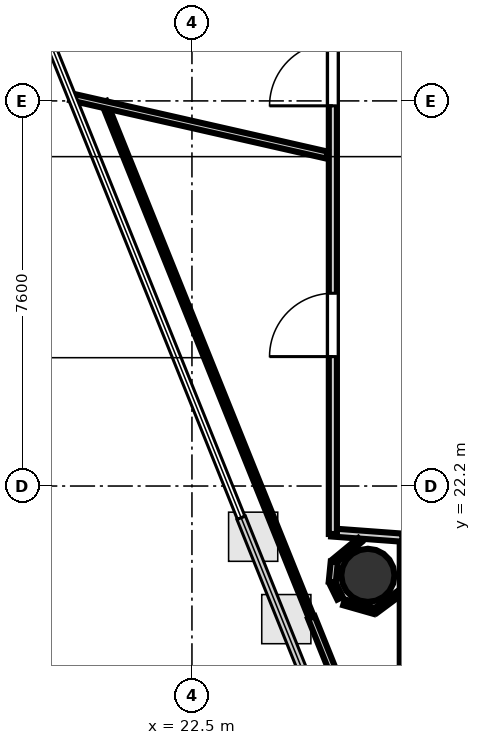
"""IFC4 building model, lengths in metres.
Left out: names, types, materials, properties, quantities, classifications, styles, units other than length and angle.
Written with IfcOpenShell. Run it as: python <this file> out.ifc"""

import sys

from ifc_helpers import new_model, si_unit, direction, frame, frame_2d, origin, origin_2d, place, context, subcontext, project, spatial, rectangle, hollow_circle, extrude, element, fill, save


model = new_model("IFC4")
c1 = context("Model", 3, precision=1e-05, world=origin(), true_north=direction((0.0, 1.0)))
c2 = subcontext(c1, "Body", "Model", "MODEL_VIEW")
j1 = project(units=[si_unit("LENGTHUNIT", "METRE"), si_unit("PLANEANGLEUNIT", "RADIAN")], contexts=[c1])
p1 = place(None, origin())
s1 = spatial("IfcSite", under=j1, at=p1, CompositionType="ELEMENT")
p2 = place(p1, origin())
s2 = spatial("IfcBuilding", under=s1, at=p2, CompositionType="ELEMENT")
p3 = place(p2, frame((0.0, 0.0, 242.7)))
s3 = spatial("IfcBuildingStorey", under=s2, at=p3, CompositionType="ELEMENT", Elevation=242.7)
p4 = place(p3, frame((25.972, 20.437, 0.0), z_axis=(0.0, 0.0, 1.0), x_axis=(1.0, 0.0, 0.0)))
e1 = element("IfcColumn", 1, at=p4, inside=s3, PredefinedType="COLUMN", context=c2, shape_type="SweptSolid", body=[
    extrude(hollow_circle(Radius=0.525, WallThickness=0.028, at=origin_2d()), origin(), (0.0, 0.0, 1.0), 3.7),
])
p5 = place(p3, frame((26.681, 17.95, 0.0), z_axis=(0.0, 0.0, 1.0), x_axis=(0.0, 1.0, 0.0)))
e2 = element("IfcWall", 2, at=p5, inside=s3, PredefinedType="PARTITIONING", context=c2, shape_type="SweptSolid", body=[
    extrude(rectangle(XDim=3.2, YDim=0.16, at=frame_2d((1.6, 0.0))), origin(), (0.0, 0.0, 1.0), 2.84),
])
p6 = place(p3, frame((26.652, 21.181, 0.0), z_axis=(0.0, 0.0, 1.0), x_axis=(-0.997303696291, 0.073384857861, 0.0)))
e3 = element("IfcWall", 3, at=p6, inside=s3, PredefinedType="PARTITIONING", context=c2, shape_type="SweptSolid", body=[
    extrude(rectangle(XDim=1.404, YDim=0.16, at=frame_2d((0.702, 0.0))), origin(), (0.0, 0.0, 1.0), 2.84),
])
p7 = place(p3, frame((25.281, 21.253, 0.0), z_axis=(0.0, 0.0, 1.0), x_axis=(0.0, 1.0, 0.0)))
e4 = element("IfcWall", 4, at=p7, inside=s3, PredefinedType="PARTITIONING", context=c2, shape_type="SweptSolid", body=[
    extrude(rectangle(XDim=11.297, YDim=0.16, at=frame_2d((5.648, 0.0))), origin(), (0.0, 0.0, 1.0), 2.84),
])
p8 = place(p7, frame((3.501, 0.0, 0.0)))
e5 = element("IfcOpeningElement", 5, at=p8, cuts=e4, PredefinedType="OPENING", context=c2, shape_type="SweptSolid", body=[
    extrude(rectangle(XDim=1.25, YDim=2.2, at=frame_2d((0.625, 1.1))), frame((0.0, 0.09, 0.0), z_axis=(0.0, -1.0, 0.0), x_axis=(1.0, 0.0, 0.0)), (0.0, 0.0, 1.0), 0.18),
])
p9 = place(p7, frame((8.45, 0.0, 0.0)))
e6 = element("IfcOpeningElement", 6, at=p9, cuts=e4, PredefinedType="OPENING", context=c2, shape_type="SweptSolid", body=[
    extrude(rectangle(XDim=1.25, YDim=2.2, at=frame_2d((0.625, 1.1))), frame((0.0, 0.09, 0.0), z_axis=(0.0, -1.0, 0.0), x_axis=(1.0, 0.0, 0.0)), (0.0, 0.0, 1.0), 0.18),
])
p10 = place(p3, frame((25.814, 21.132, 0.0), z_axis=(0.0, 0.0, 1.0), x_axis=(-0.771205244548, -0.636586577601, 0.0)))
e7 = element("IfcWall", 7, at=p10, inside=s3, PredefinedType="PARTITIONING", context=c2, shape_type="SweptSolid", body=[
    extrude(rectangle(XDim=0.642, YDim=0.105, at=frame_2d((0.321, 0.0))), origin(), (0.0, 0.0, 1.0), 2.84),
])
p11 = place(p3, frame((25.308, 20.702, 0.0), z_axis=(0.0, 0.0, 1.0), x_axis=(-0.098227170207, -0.995164018156, 0.0)))
e8 = element("IfcWall", 8, at=p11, inside=s3, PredefinedType="PARTITIONING", context=c2, shape_type="SweptSolid", body=[
    extrude(rectangle(XDim=0.398, YDim=0.14, at=frame_2d((0.199, 0.0))), origin(), (0.0, 0.0, 1.0), 2.84),
])
p12 = place(p3, frame((25.272, 20.29, 0.0), z_axis=(0.0, 0.0, 1.0), x_axis=(0.441158146801, -0.897429378565, 0.0)))
e9 = element("IfcWall", 9, at=p12, inside=s3, PredefinedType="PARTITIONING", context=c2, shape_type="SweptSolid", body=[
    extrude(rectangle(XDim=0.339, YDim=0.12, at=frame_2d((0.17, 0.0))), origin(), (0.0, 0.0, 1.0), 2.84),
])
p13 = place(p3, frame((24.826, 19.683, 0.0), z_axis=(0.0, 0.0, 1.0), x_axis=(-0.37331171628, 0.92770596769, 0.0)))
e10 = element("IfcWall", 10, at=p13, inside=s3, PredefinedType="PARTITIONING", context=c2, shape_type="SweptSolid", body=[
    extrude(rectangle(XDim=10.885, YDim=0.105, at=frame_2d((5.443, 0.0))), origin(), (0.0, 0.0, 1.0), 2.84),
])
p14 = place(p3, frame((20.111, 29.88, 0.0), z_axis=(0.0, 0.0, 1.0), x_axis=(0.975101832546, -0.221757561686, 0.0)))
e11 = element("IfcWall", 11, at=p14, inside=s3, PredefinedType="PARTITIONING", context=c2, shape_type="SweptSolid", body=[
    extrude(rectangle(XDim=5.181, YDim=0.14, at=frame_2d((2.59, 0.0))), origin(), (0.0, 0.0, 1.0), 2.84),
])
p15 = place(p3, frame((28.542, 10.448, 0.0), z_axis=(0.0, 0.0, 1.0), x_axis=(-0.373309021007, 0.927707052272, 0.0)))
e12 = element("IfcWall", 12, at=p15, inside=s3, PredefinedType="PARTITIONING", context=c2, shape_type="SweptSolid", body=[
    extrude(rectangle(XDim=9.87, YDim=0.14, at=frame_2d((4.935, 0.0))), origin(), (0.0, 0.0, 1.0), 2.84),
])
p16 = place(p3, frame((25.501, 19.905, 0.0), z_axis=(0.0, 0.0, 1.0), x_axis=(0.961835324747, -0.273628960581, 0.0)))
e13 = element("IfcWall", 13, at=p16, inside=s3, PredefinedType="PARTITIONING", context=c2, shape_type="SweptSolid", body=[
    extrude(rectangle(XDim=0.62, YDim=0.12, at=frame_2d((0.31, 0.0))), origin(), (0.0, 0.0, 1.0), 2.84),
])
p17 = place(p3, frame((26.124, 19.74, 0.0), z_axis=(0.0, 0.0, 1.0), x_axis=(0.802928569277, 0.596075257529, 0.0)))
e14 = element("IfcWall", 14, at=p17, inside=s3, PredefinedType="PARTITIONING", context=c2, shape_type="SweptSolid", body=[
    extrude(rectangle(XDim=0.578, YDim=0.105, at=frame_2d((0.289, 0.0))), origin(), (0.0, 0.0, 1.0), 2.84),
])
p18 = place(p8, origin())
e15 = element("IfcDoor", 15, at=p18, inside=s3, OperationType="SINGLE_SWING_LEFT", PredefinedType="DOOR", context=c2, shape_type="SweptSolid", body=[
    extrude(rectangle(XDim=1.25, YDim=2.2, at=frame_2d((0.625, 1.1))), frame((0.0, 0.025, 0.0), z_axis=(0.0, -1.0, 0.0), x_axis=(1.0, 0.0, 0.0)), (0.0, 0.0, 1.0), 0.05),
])
fill(e5, e15)
p19 = place(p9, origin())
e16 = element("IfcDoor", 16, at=p19, inside=s3, OperationType="SINGLE_SWING_LEFT", PredefinedType="DOOR", context=c2, shape_type="SweptSolid", body=[
    extrude(rectangle(XDim=1.25, YDim=2.2, at=frame_2d((0.625, 1.1))), frame((0.0, 0.025, 0.0), z_axis=(0.0, -1.0, 0.0), x_axis=(1.0, 0.0, 0.0)), (0.0, 0.0, 1.0), 0.05),
])
fill(e6, e16)
save(model, sys.argv[1])
